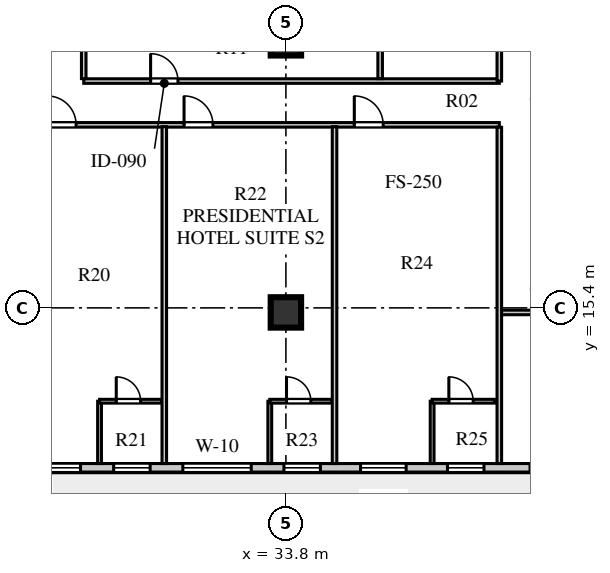
"""IFC4 building model, lengths in metres.
Left out: names, types, materials, properties, quantities, classifications, styles, units other than length and angle.
Written with IfcOpenShell. Run it as: python <this file> out.ifc"""

import sys

from ifc_helpers import new_model, si_unit, direction, frame, frame_2d, origin, origin_2d, place, context, subcontext, project, spatial, rectangle, extrude, element, fill, save


model = new_model("IFC4")
c1 = context("Model", 3, precision=1e-05, world=origin(), true_north=direction((0.0, 1.0)))
c2 = subcontext(c1, "Body", "Model", "MODEL_VIEW")
j1 = project(units=[si_unit("LENGTHUNIT", "METRE"), si_unit("PLANEANGLEUNIT", "RADIAN")], contexts=[c1])
p1 = place(None, origin())
s1 = spatial("IfcSite", under=j1, at=p1, CompositionType="ELEMENT")
p2 = place(p1, origin())
s2 = spatial("IfcBuilding", under=s1, at=p2, CompositionType="ELEMENT")
p3 = place(p2, frame((0.0, 0.0, 134.8)))
s3 = spatial("IfcBuildingStorey", under=s2, at=p3, CompositionType="ELEMENT", Elevation=134.8)
for number, where, z_axis, x_axis in (
    (1, (33.8, 15.25, 0.0), (0.0, 0.0, 1.0), (1.0, 0.0, 0.0)),
    (2, (33.8, 24.2, 0.0), (0.0, 0.0, 1.0), (1.0, 0.0, 0.0)),
):
    element("IfcColumn", number, at=place(p3, frame(where, z_axis=z_axis, x_axis=x_axis)), inside=s3, PredefinedType="COLUMN", context=c2, shape_type="SweptSolid", body=[
        extrude(rectangle(XDim=1.0, YDim=1.0, at=origin_2d()), origin(), (0.0, 0.0, 1.0), 3.6),
    ])
p4 = place(p3, frame((13.25, 10.14, 0.0), z_axis=(0.0, 0.0, 1.0), x_axis=(1.0, 0.0, 0.0)))
e3 = element("IfcWall", 3, at=p4, inside=s3, PredefinedType="STANDARD", context=c2, shape_type="SweptSolid", body=[
    extrude(rectangle(XDim=32.1, YDim=0.28, at=frame_2d((16.05, 0.0))), origin(), (0.0, 0.0, 1.0), 3.6),
])
p5 = place(p4, frame((0.95, 0.0, 0.0)))
e4 = element("IfcOpeningElement", 4, at=p5, cuts=e3, PredefinedType="OPENING", context=c2, shape_type="SweptSolid", body=[
    extrude(rectangle(XDim=1.0, YDim=2.05, at=frame_2d((0.5, 1.025))), frame((0.0, 0.15, 0.0), z_axis=(0.0, -1.0, 0.0), x_axis=(1.0, 0.0, 0.0)), (0.0, 0.0, 1.0), 0.3),
])
p6 = place(p4, frame((6.255, 0.0, 0.8)))
e5 = element("IfcOpeningElement", 5, at=p6, cuts=e3, PredefinedType="OPENING", context=c2, shape_type="SweptSolid", body=[
    extrude(rectangle(XDim=1.35, YDim=1.9, at=frame_2d((0.675, 0.95))), frame((0.0, 0.15, 0.0), z_axis=(0.0, -1.0, 0.0), x_axis=(1.0, 0.0, 0.0)), (0.0, 0.0, 1.0), 0.3),
])
p7 = place(p4, frame((12.595, 0.0, 0.8)))
e6 = element("IfcOpeningElement", 6, at=p7, cuts=e3, PredefinedType="OPENING", context=c2, shape_type="SweptSolid", body=[
    extrude(rectangle(XDim=1.2, YDim=1.75, at=frame_2d((0.6, 0.875))), frame((0.0, 0.15, 0.0), z_axis=(0.0, -1.0, 0.0), x_axis=(1.0, 0.0, 0.0)), (0.0, 0.0, 1.0), 0.3),
])
p8 = place(p4, frame((14.885, 0.0, 0.8)))
e7 = element("IfcOpeningElement", 7, at=p8, cuts=e3, PredefinedType="OPENING", context=c2, shape_type="SweptSolid", body=[
    extrude(rectangle(XDim=1.2, YDim=1.75, at=frame_2d((0.6, 0.875))), frame((0.0, 0.15, 0.0), z_axis=(0.0, -1.0, 0.0), x_axis=(1.0, 0.0, 0.0)), (0.0, 0.0, 1.0), 0.3),
])
p9 = place(p4, frame((17.16, 0.0, 0.8)))
e8 = element("IfcOpeningElement", 8, at=p9, cuts=e3, PredefinedType="OPENING", context=c2, shape_type="SweptSolid", body=[
    extrude(rectangle(XDim=2.25, YDim=2.0, at=frame_2d((1.125, 1.0))), frame((0.0, 0.15, 0.0), z_axis=(0.0, -1.0, 0.0), x_axis=(1.0, 0.0, 0.0)), (0.0, 0.0, 1.0), 0.3),
])
p10 = place(p4, frame((20.485, 0.0, 0.8)))
e9 = element("IfcOpeningElement", 9, at=p10, cuts=e3, PredefinedType="OPENING", context=c2, shape_type="SweptSolid", body=[
    extrude(rectangle(XDim=1.2, YDim=1.75, at=frame_2d((0.6, 0.875))), frame((0.0, 0.15, 0.0), z_axis=(0.0, -1.0, 0.0), x_axis=(1.0, 0.0, 0.0)), (0.0, 0.0, 1.0), 0.3),
])
p11 = place(p4, frame((23.005, 0.0, 0.8)))
e10 = element("IfcOpeningElement", 10, at=p11, cuts=e3, PredefinedType="OPENING", context=c2, shape_type="SweptSolid", body=[
    extrude(rectangle(XDim=1.5, YDim=2.0, at=frame_2d((0.75, 1.0))), frame((0.0, 0.15, 0.0), z_axis=(0.0, -1.0, 0.0), x_axis=(1.0, 0.0, 0.0)), (0.0, 0.0, 1.0), 0.3),
])
p12 = place(p4, frame((25.865, 0.0, 0.8)))
e11 = element("IfcOpeningElement", 11, at=p12, cuts=e3, PredefinedType="OPENING", context=c2, shape_type="SweptSolid", body=[
    extrude(rectangle(XDim=1.2, YDim=1.75, at=frame_2d((0.6, 0.875))), frame((0.0, 0.15, 0.0), z_axis=(0.0, -1.0, 0.0), x_axis=(1.0, 0.0, 0.0)), (0.0, 0.0, 1.0), 0.3),
])
p13 = place(p4, frame((28.58, 0.0, 0.8)))
e12 = element("IfcOpeningElement", 12, at=p13, cuts=e3, PredefinedType="OPENING", context=c2, shape_type="SweptSolid", body=[
    extrude(rectangle(XDim=2.4, YDim=2.05, at=frame_2d((1.2, 1.025))), frame((0.0, 0.15, 0.0), z_axis=(0.0, -1.0, 0.0), x_axis=(1.0, 0.0, 0.0)), (0.0, 0.0, 1.0), 0.3),
])
p14 = place(p3, frame((25.22, 21.42, 0.0), z_axis=(0.0, 0.0, 1.0), x_axis=(1.0, 0.0, 0.0)))
e13 = element("IfcWall", 13, at=p14, inside=s3, PredefinedType="PARTITIONING", context=c2, shape_type="SweptSolid", body=[
    extrude(rectangle(XDim=15.6, YDim=0.15, at=frame_2d((7.8, 0.0))), origin(), (0.0, 0.0, 1.0), 3.2),
])
p15 = place(p14, frame((0.73, 0.0, 0.0)))
e14 = element("IfcOpeningElement", 14, at=p15, cuts=e13, PredefinedType="OPENING", context=c2, shape_type="SweptSolid", body=[
    extrude(rectangle(XDim=0.95, YDim=2.1, at=frame_2d((0.475, 1.05))), frame((0.0, 0.085, 0.0), z_axis=(0.0, -1.0, 0.0), x_axis=(1.0, 0.0, 0.0)), (0.0, 0.0, 1.0), 0.17),
])
p16 = place(p14, frame((5.23, 0.0, 0.0)))
e15 = element("IfcOpeningElement", 15, at=p16, cuts=e13, PredefinedType="OPENING", context=c2, shape_type="SweptSolid", body=[
    extrude(rectangle(XDim=0.95, YDim=2.1, at=frame_2d((0.475, 1.05))), frame((0.0, 0.085, 0.0), z_axis=(0.0, -1.0, 0.0), x_axis=(1.0, 0.0, 0.0)), (0.0, 0.0, 1.0), 0.17),
])
p17 = place(p14, frame((10.83, 0.0, 0.0)))
e16 = element("IfcOpeningElement", 16, at=p17, cuts=e13, PredefinedType="OPENING", context=c2, shape_type="SweptSolid", body=[
    extrude(rectangle(XDim=0.95, YDim=2.1, at=frame_2d((0.475, 1.05))), frame((0.0, 0.085, 0.0), z_axis=(0.0, -1.0, 0.0), x_axis=(1.0, 0.0, 0.0)), (0.0, 0.0, 1.0), 0.17),
])
p18 = place(p3, frame((27.15, 22.86, 0.0), z_axis=(0.0, 0.0, 1.0), x_axis=(1.0, 0.0, 0.0)))
e17 = element("IfcWall", 17, at=p18, inside=s3, PredefinedType="PARTITIONING", context=c2, shape_type="SweptSolid", body=[
    extrude(rectangle(XDim=13.67, YDim=0.15, at=frame_2d((6.835, 0.0))), origin(), (0.0, 0.0, 1.0), 3.6),
])
p19 = place(p18, frame((2.2, 0.0, 0.0)))
e18 = element("IfcOpeningElement", 18, at=p19, cuts=e17, PredefinedType="OPENING", context=c2, shape_type="SweptSolid", body=[
    extrude(rectangle(XDim=0.9, YDim=2.08, at=frame_2d((0.45, 1.04))), frame((0.0, 0.085, 0.0), z_axis=(0.0, -1.0, 0.0), x_axis=(1.0, 0.0, 0.0)), (0.0, 0.0, 1.0), 0.17),
])
p20 = place(p3, frame((40.82, 15.25, 0.0), z_axis=(0.0, 0.0, 1.0), x_axis=(1.0, 0.0, 0.0)))
e19 = element("IfcWall", 19, at=p20, inside=s3, PredefinedType="PARTITIONING", context=c2, shape_type="SweptSolid", body=[
    extrude(rectangle(XDim=7.3, YDim=0.15, at=frame_2d((3.65, 0.0))), origin(), (0.0, 0.0, 1.0), 2.95),
])
p21 = place(p3, frame((40.82, 22.86, 0.0), z_axis=(0.0, 0.0, 1.0), x_axis=(0.0, 1.0, 0.0)))
e20 = element("IfcWall", 20, at=p21, inside=s3, PredefinedType="PARTITIONING", context=c2, shape_type="SweptSolid", body=[
    extrude(rectangle(XDim=4.36, YDim=0.15, at=frame_2d((2.18, 0.0))), origin(), (0.0, 0.0, 1.0), 3.6),
])
p22 = place(p21, frame((1.4, 0.0, 0.0)))
e21 = element("IfcOpeningElement", 21, at=p22, cuts=e20, PredefinedType="OPENING", context=c2, shape_type="SweptSolid", body=[
    extrude(rectangle(XDim=0.95, YDim=2.1, at=frame_2d((0.475, 1.05))), frame((0.0, 0.085, 0.0), z_axis=(0.0, -1.0, 0.0), x_axis=(1.0, 0.0, 0.0)), (0.0, 0.0, 1.0), 0.17),
])
p23 = place(p3, frame((36.9, 22.94, 0.0), z_axis=(0.0, 0.0, 1.0), x_axis=(0.0, 1.0, 0.0)))
e22 = element("IfcWall", 22, at=p23, inside=s3, PredefinedType="PARTITIONING", context=c2, shape_type="SweptSolid", body=[
    extrude(rectangle(XDim=4.28, YDim=0.15, at=frame_2d((2.14, 0.0))), origin(), (0.0, 0.0, 1.0), 3.6),
])
p24 = place(p3, frame((27.15, 22.94, 0.0), z_axis=(0.0, 0.0, 1.0), x_axis=(0.0, 1.0, 0.0)))
e23 = element("IfcWall", 23, at=p24, inside=s3, PredefinedType="PARTITIONING", context=c2, shape_type="SweptSolid", body=[
    extrude(rectangle(XDim=1.94, YDim=0.15, at=frame_2d((0.97, 0.0))), origin(), (0.0, 0.0, 1.0), 3.6),
])
p25 = place(p3, frame((40.82, 10.28, 0.0), z_axis=(0.0, 0.0, 1.0), x_axis=(0.0, 1.0, 0.0)))
e24 = element("IfcWall", 24, at=p25, inside=s3, PredefinedType="PARTITIONING", context=c2, shape_type="SweptSolid", body=[
    extrude(rectangle(XDim=11.06, YDim=0.15, at=frame_2d((5.53, 0.0))), origin(), (0.0, 0.0, 1.0), 3.6),
])
p26 = place(p3, frame((27.67, 10.28, 0.0), z_axis=(0.0, 0.0, 1.0), x_axis=(0.0, 1.0, 0.0)))
e25 = element("IfcWall", 25, at=p26, inside=s3, PredefinedType="PLUMBINGWALL", context=c2, shape_type="SweptSolid", body=[
    extrude(rectangle(XDim=2.05, YDim=0.125, at=frame_2d((1.025, 0.0))), origin(), (0.0, 0.0, 1.0), 3.6),
])
p27 = place(p3, frame((27.67, 12.33, 0.0), z_axis=(0.0, 0.0, 1.0), x_axis=(1.0, 0.0, 0.0)))
e26 = element("IfcWall", 26, at=p27, inside=s3, PredefinedType="PLUMBINGWALL", context=c2, shape_type="SweptSolid", body=[
    extrude(rectangle(XDim=2.05, YDim=0.125, at=frame_2d((1.025, 0.0))), origin(), (0.0, 0.0, 1.0), 3.6),
])
p28 = place(p27, frame((0.55, 0.0, 0.0)))
e27 = element("IfcOpeningElement", 27, at=p28, cuts=e26, PredefinedType="OPENING", context=c2, shape_type="SweptSolid", body=[
    extrude(rectangle(XDim=0.8, YDim=2.05, at=frame_2d((0.4, 1.025))), frame((0.0, 0.073, 0.0), z_axis=(0.0, -1.0, 0.0), x_axis=(1.0, 0.0, 0.0)), (0.0, 0.0, 1.0), 0.145),
])
p29 = place(p3, frame((29.8, 10.28, 0.0), z_axis=(0.0, 0.0, 1.0), x_axis=(0.0, 1.0, 0.0)))
e28 = element("IfcWall", 28, at=p29, inside=s3, PredefinedType="PARTITIONING", context=c2, shape_type="SweptSolid", body=[
    extrude(rectangle(XDim=11.08, YDim=0.15, at=frame_2d((5.54, 0.0))), origin(), (0.0, 0.0, 1.0), 3.6),
])
p30 = place(p3, frame((33.27, 10.28, 0.0), z_axis=(0.0, 0.0, 1.0), x_axis=(0.0, 1.0, 0.0)))
e29 = element("IfcWall", 29, at=p30, inside=s3, PredefinedType="PLUMBINGWALL", context=c2, shape_type="SweptSolid", body=[
    extrude(rectangle(XDim=2.05, YDim=0.125, at=frame_2d((1.025, 0.0))), origin(), (0.0, 0.0, 1.0), 3.6),
])
p31 = place(p3, frame((33.27, 12.33, 0.0), z_axis=(0.0, 0.0, 1.0), x_axis=(1.0, 0.0, 0.0)))
e30 = element("IfcWall", 30, at=p31, inside=s3, PredefinedType="PLUMBINGWALL", context=c2, shape_type="SweptSolid", body=[
    extrude(rectangle(XDim=2.05, YDim=0.125, at=frame_2d((1.025, 0.0))), origin(), (0.0, 0.0, 1.0), 3.6),
])
p32 = place(p31, frame((0.55, 0.0, 0.0)))
e31 = element("IfcOpeningElement", 31, at=p32, cuts=e30, PredefinedType="OPENING", context=c2, shape_type="SweptSolid", body=[
    extrude(rectangle(XDim=0.8, YDim=2.05, at=frame_2d((0.4, 1.025))), frame((0.0, 0.073, 0.0), z_axis=(0.0, -1.0, 0.0), x_axis=(1.0, 0.0, 0.0)), (0.0, 0.0, 1.0), 0.145),
])
p33 = place(p3, frame((35.4, 10.28, 0.0), z_axis=(0.0, 0.0, 1.0), x_axis=(0.0, 1.0, 0.0)))
e32 = element("IfcWall", 32, at=p33, inside=s3, PredefinedType="PARTITIONING", context=c2, shape_type="SweptSolid", body=[
    extrude(rectangle(XDim=11.08, YDim=0.15, at=frame_2d((5.54, 0.0))), origin(), (0.0, 0.0, 1.0), 3.6),
])
p34 = place(p3, frame((38.61, 10.28, 0.0), z_axis=(0.0, 0.0, 1.0), x_axis=(0.0, 1.0, 0.0)))
e33 = element("IfcWall", 33, at=p34, inside=s3, PredefinedType="PLUMBINGWALL", context=c2, shape_type="SweptSolid", body=[
    extrude(rectangle(XDim=2.05, YDim=0.125, at=frame_2d((1.025, 0.0))), origin(), (0.0, 0.0, 1.0), 3.6),
])
p35 = place(p3, frame((38.61, 12.33, 0.0), z_axis=(0.0, 0.0, 1.0), x_axis=(1.0, 0.0, 0.0)))
e34 = element("IfcWall", 34, at=p35, inside=s3, PredefinedType="PLUMBINGWALL", context=c2, shape_type="SweptSolid", body=[
    extrude(rectangle(XDim=2.05, YDim=0.125, at=frame_2d((1.025, 0.0))), origin(), (0.0, 0.0, 1.0), 3.6),
])
p36 = place(p35, frame((0.55, 0.0, 0.0)))
e35 = element("IfcOpeningElement", 35, at=p36, cuts=e34, PredefinedType="OPENING", context=c2, shape_type="SweptSolid", body=[
    extrude(rectangle(XDim=0.8, YDim=2.05, at=frame_2d((0.4, 1.025))), frame((0.0, 0.073, 0.0), z_axis=(0.0, -1.0, 0.0), x_axis=(1.0, 0.0, 0.0)), (0.0, 0.0, 1.0), 0.145),
])
p37 = place(p7, origin())
e36 = element("IfcWindow", 36, at=p37, inside=s3, PartitioningType="SINGLE_PANEL", PredefinedType="WINDOW", context=c2, shape_type="SweptSolid", body=[
    extrude(rectangle(XDim=1.2, YDim=1.75, at=frame_2d((0.6, 0.875))), frame((0.0, 0.03, 0.0), z_axis=(0.0, -1.0, 0.0), x_axis=(1.0, 0.0, 0.0)), (0.0, 0.0, 1.0), 0.06),
])
fill(e6, e36)
p38 = place(p8, origin())
e37 = element("IfcWindow", 37, at=p38, inside=s3, PartitioningType="SINGLE_PANEL", PredefinedType="WINDOW", context=c2, shape_type="SweptSolid", body=[
    extrude(rectangle(XDim=1.2, YDim=1.75, at=frame_2d((0.6, 0.875))), frame((0.0, 0.03, 0.0), z_axis=(0.0, -1.0, 0.0), x_axis=(1.0, 0.0, 0.0)), (0.0, 0.0, 1.0), 0.06),
])
fill(e7, e37)
p39 = place(p9, origin())
e38 = element("IfcWindow", 38, at=p39, inside=s3, PartitioningType="SINGLE_PANEL", PredefinedType="WINDOW", context=c2, shape_type="SweptSolid", body=[
    extrude(rectangle(XDim=2.25, YDim=2.0, at=frame_2d((1.125, 1.0))), frame((0.0, 0.03, 0.0), z_axis=(0.0, -1.0, 0.0), x_axis=(1.0, 0.0, 0.0)), (0.0, 0.0, 1.0), 0.06),
])
fill(e8, e38)
p40 = place(p10, origin())
e39 = element("IfcWindow", 39, at=p40, inside=s3, PartitioningType="SINGLE_PANEL", PredefinedType="WINDOW", context=c2, shape_type="SweptSolid", body=[
    extrude(rectangle(XDim=1.2, YDim=1.75, at=frame_2d((0.6, 0.875))), frame((0.0, 0.03, 0.0), z_axis=(0.0, -1.0, 0.0), x_axis=(1.0, 0.0, 0.0)), (0.0, 0.0, 1.0), 0.06),
])
fill(e9, e39)
p41 = place(p11, origin())
e40 = element("IfcWindow", 40, at=p41, inside=s3, PartitioningType="SINGLE_PANEL", PredefinedType="WINDOW", context=c2, shape_type="SweptSolid", body=[
    extrude(rectangle(XDim=1.5, YDim=2.0, at=frame_2d((0.75, 1.0))), frame((0.0, 0.03, 0.0), z_axis=(0.0, -1.0, 0.0), x_axis=(1.0, 0.0, 0.0)), (0.0, 0.0, 1.0), 0.06),
])
fill(e10, e40)
p42 = place(p12, origin())
e41 = element("IfcWindow", 41, at=p42, inside=s3, PartitioningType="SINGLE_PANEL", PredefinedType="WINDOW", context=c2, shape_type="SweptSolid", body=[
    extrude(rectangle(XDim=1.2, YDim=1.75, at=frame_2d((0.6, 0.875))), frame((0.0, 0.03, 0.0), z_axis=(0.0, -1.0, 0.0), x_axis=(1.0, 0.0, 0.0)), (0.0, 0.0, 1.0), 0.06),
])
fill(e11, e41)
p43 = place(p19, origin())
e42 = element("IfcDoor", 42, at=p43, inside=s3, OperationType="SINGLE_SWING_LEFT", PredefinedType="DOOR", context=c2, shape_type="SweptSolid", body=[
    extrude(rectangle(XDim=0.9, YDim=2.08, at=frame_2d((0.45, 1.04))), frame((0.0, 0.025, 0.0), z_axis=(0.0, -1.0, 0.0), x_axis=(1.0, 0.0, 0.0)), (0.0, 0.0, 1.0), 0.05),
])
fill(e18, e42)
p44 = place(p15, frame((0.95, 0.0, 0.0), z_axis=(0.0, 0.0, 1.0), x_axis=(-1.0, 0.0, 0.0)))
e43 = element("IfcDoor", 43, at=p44, inside=s3, OperationType="SINGLE_SWING_RIGHT", PredefinedType="DOOR", context=c2, shape_type="SweptSolid", body=[
    extrude(rectangle(XDim=0.95, YDim=2.1, at=frame_2d((0.475, 1.05))), frame((0.0, 0.025, 0.0), z_axis=(0.0, -1.0, 0.0), x_axis=(1.0, 0.0, 0.0)), (0.0, 0.0, 1.0), 0.05),
])
fill(e14, e43)
p45 = place(p28, origin())
e44 = element("IfcDoor", 44, at=p45, inside=s3, OperationType="SINGLE_SWING_LEFT", PredefinedType="DOOR", context=c2, shape_type="SweptSolid", body=[
    extrude(rectangle(XDim=0.8, YDim=2.05, at=frame_2d((0.4, 1.025))), frame((0.0, 0.025, 0.0), z_axis=(0.0, -1.0, 0.0), x_axis=(1.0, 0.0, 0.0)), (0.0, 0.0, 1.0), 0.05),
])
fill(e27, e44)
p46 = place(p16, frame((0.95, 0.0, 0.0), z_axis=(0.0, 0.0, 1.0), x_axis=(-1.0, 0.0, 0.0)))
e45 = element("IfcDoor", 45, at=p46, inside=s3, OperationType="SINGLE_SWING_RIGHT", PredefinedType="DOOR", context=c2, shape_type="SweptSolid", body=[
    extrude(rectangle(XDim=0.95, YDim=2.1, at=frame_2d((0.475, 1.05))), frame((0.0, 0.025, 0.0), z_axis=(0.0, -1.0, 0.0), x_axis=(1.0, 0.0, 0.0)), (0.0, 0.0, 1.0), 0.05),
])
fill(e15, e45)
p47 = place(p32, origin())
e46 = element("IfcDoor", 46, at=p47, inside=s3, OperationType="SINGLE_SWING_LEFT", PredefinedType="DOOR", context=c2, shape_type="SweptSolid", body=[
    extrude(rectangle(XDim=0.8, YDim=2.05, at=frame_2d((0.4, 1.025))), frame((0.0, 0.025, 0.0), z_axis=(0.0, -1.0, 0.0), x_axis=(1.0, 0.0, 0.0)), (0.0, 0.0, 1.0), 0.05),
])
fill(e31, e46)
p48 = place(p17, frame((0.95, 0.0, 0.0), z_axis=(0.0, 0.0, 1.0), x_axis=(-1.0, 0.0, 0.0)))
e47 = element("IfcDoor", 47, at=p48, inside=s3, OperationType="SINGLE_SWING_RIGHT", PredefinedType="DOOR", context=c2, shape_type="SweptSolid", body=[
    extrude(rectangle(XDim=0.95, YDim=2.1, at=frame_2d((0.475, 1.05))), frame((0.0, 0.025, 0.0), z_axis=(0.0, -1.0, 0.0), x_axis=(1.0, 0.0, 0.0)), (0.0, 0.0, 1.0), 0.05),
])
fill(e16, e47)
p49 = place(p36, origin())
e48 = element("IfcDoor", 48, at=p49, inside=s3, OperationType="SINGLE_SWING_LEFT", PredefinedType="DOOR", context=c2, shape_type="SweptSolid", body=[
    extrude(rectangle(XDim=0.8, YDim=2.05, at=frame_2d((0.4, 1.025))), frame((0.0, 0.025, 0.0), z_axis=(0.0, -1.0, 0.0), x_axis=(1.0, 0.0, 0.0)), (0.0, 0.0, 1.0), 0.05),
])
fill(e35, e48)
save(model, sys.argv[1])
